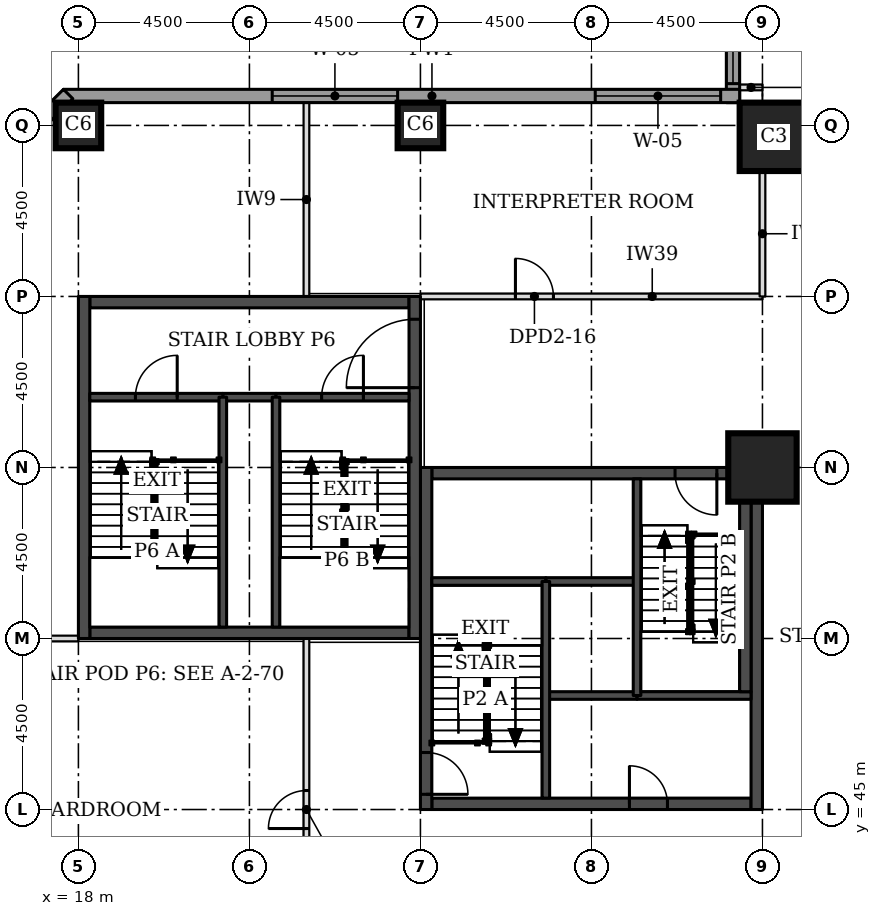
"""IFC4 building model, lengths in metres.
Left out: names, types, materials, properties, quantities, classifications, styles, units other than length and angle.
Written with IfcOpenShell. Run it as: python <this file> out.ifc"""

import sys

from ifc_helpers import new_model, si_unit, direction, frame, frame_2d, origin, origin_2d, place, context, subcontext, project, spatial, rectangle, extrude, element, fill, save


model = new_model("IFC4")
c1 = context("Model", 3, precision=1e-05, world=origin(), true_north=direction((0.0, 1.0)))
c2 = subcontext(c1, "Body", "Model", "MODEL_VIEW")
j1 = project(units=[si_unit("LENGTHUNIT", "METRE"), si_unit("PLANEANGLEUNIT", "RADIAN")], contexts=[c1])
p1 = place(None, origin())
s1 = spatial("IfcSite", under=j1, at=p1, CompositionType="ELEMENT")
p2 = place(p1, origin())
s2 = spatial("IfcBuilding", under=s1, at=p2, CompositionType="ELEMENT")
p3 = place(p2, frame((0.0, 0.0, 13.5)))
s3 = spatial("IfcBuildingStorey", under=s2, at=p3, CompositionType="ELEMENT", Elevation=13.5)
p4 = place(p3, frame((36.0, 54.0, 0.0), z_axis=(0.0, 0.0, 1.0), x_axis=(1.0, 0.0, 0.0)))
e1 = element("IfcColumn", 1, at=p4, inside=s3, PredefinedType="COLUMN", context=c2, shape_type="SweptSolid", body=[
    extrude(rectangle(XDim=1.8, YDim=1.8, at=origin_2d()), origin(), (0.0, 0.0, 1.0), 5.0),
])
for number, where, z_axis, x_axis in (
    (2, (18.0, 63.0, 0.0), (0.0, 0.0, 1.0), (1.0, 0.0, 0.0)),
    (3, (27.0, 63.0, 0.0), (0.0, 0.0, 1.0), (1.0, 0.0, 0.0)),
):
    element("IfcColumn", number, at=place(p3, frame(where, z_axis=z_axis, x_axis=x_axis)), inside=s3, PredefinedType="COLUMN", context=c2, shape_type="SweptSolid", body=[
        extrude(rectangle(XDim=1.2, YDim=1.2, at=origin_2d()), origin(), (0.0, 0.0, 1.0), 5.0),
    ])
p5 = place(p3, frame((36.3, 62.7, 0.0), z_axis=(0.0, 0.0, 1.0), x_axis=(1.0, 0.0, 0.0)))
e4 = element("IfcColumn", 4, at=p5, inside=s3, PredefinedType="COLUMN", context=c2, shape_type="SweptSolid", body=[
    extrude(rectangle(XDim=1.8, YDim=1.8, at=origin_2d()), origin(), (0.0, 0.0, 1.0), 5.0),
])
p6 = place(p3, frame((27.3, 45.15, 0.0), z_axis=(0.0, 0.0, 1.0), x_axis=(1.0, 0.0, 0.0)))
e5 = element("IfcWall", 5, at=p6, inside=s3, PredefinedType="SHEAR", context=c2, shape_type="SweptSolid", body=[
    extrude(rectangle(XDim=8.4, YDim=0.3, at=frame_2d((4.2, 0.0))), origin(), (0.0, 0.0, 1.0), 5.0),
])
p7 = place(p6, frame((5.2, 0.0, 0.0)))
e6 = element("IfcOpeningElement", 6, at=p7, cuts=e5, PredefinedType="OPENING", context=c2, shape_type="SweptSolid", body=[
    extrude(rectangle(XDim=1.0, YDim=2.1, at=frame_2d((0.5, 1.05))), frame((0.0, 0.16, 0.0), z_axis=(0.0, -1.0, 0.0), x_axis=(1.0, 0.0, 0.0)), (0.0, 0.0, 1.0), 0.32),
])
p8 = place(p3, frame((27.3, 53.85, 0.0), z_axis=(0.0, 0.0, 1.0), x_axis=(1.0, 0.0, 0.0)))
e7 = element("IfcWall", 7, at=p8, inside=s3, PredefinedType="SHEAR", context=c2, shape_type="SweptSolid", body=[
    extrude(rectangle(XDim=8.4, YDim=0.3, at=frame_2d((4.2, 0.0))), origin(), (0.0, 0.0, 1.0), 5.0),
])
p9 = place(p8, frame((6.4, 0.0, 0.0)))
e8 = element("IfcOpeningElement", 8, at=p9, cuts=e7, PredefinedType="OPENING", context=c2, shape_type="SweptSolid", body=[
    extrude(rectangle(XDim=1.1, YDim=2.1, at=frame_2d((0.55, 1.05))), frame((0.0, 0.16, 0.0), z_axis=(0.0, -1.0, 0.0), x_axis=(1.0, 0.0, 0.0)), (0.0, 0.0, 1.0), 0.32),
])
p10 = place(p3, frame((27.15, 45.0, 0.0), z_axis=(0.0, 0.0, 1.0), x_axis=(0.0, 1.0, 0.0)))
e9 = element("IfcWall", 9, at=p10, inside=s3, PredefinedType="SHEAR", context=c2, shape_type="SweptSolid", body=[
    extrude(rectangle(XDim=9.0, YDim=0.3, at=frame_2d((4.5, 0.0))), origin(), (0.0, 0.0, 1.0), 5.0),
])
p11 = place(p10, frame((0.4, 0.0, 0.0)))
e10 = element("IfcOpeningElement", 10, at=p11, cuts=e9, PredefinedType="OPENING", context=c2, shape_type="SweptSolid", body=[
    extrude(rectangle(XDim=1.1, YDim=2.1, at=frame_2d((0.55, 1.05))), frame((0.0, 0.16, 0.0), z_axis=(0.0, -1.0, 0.0), x_axis=(1.0, 0.0, 0.0)), (0.0, 0.0, 1.0), 0.32),
])
p12 = place(p3, frame((35.85, 45.0, 0.0), z_axis=(0.0, 0.0, 1.0), x_axis=(0.0, 1.0, 0.0)))
e11 = element("IfcWall", 11, at=p12, inside=s3, PredefinedType="SHEAR", context=c2, shape_type="SweptSolid", body=[
    extrude(rectangle(XDim=9.0, YDim=0.3, at=frame_2d((4.5, 0.0))), origin(), (0.0, 0.0, 1.0), 5.0),
])
for number, where, z_axis, x_axis in (
    (12, (18.3, 49.65, 0.0), (0.0, 0.0, 1.0), (1.0, 0.0, 0.0)),
    (13, (18.3, 58.35, 0.0), (0.0, 0.0, 1.0), (1.0, 0.0, 0.0)),
):
    element("IfcWall", number, at=place(p3, frame(where, z_axis=z_axis, x_axis=x_axis)), inside=s3, PredefinedType="SHEAR", context=c2, shape_type="SweptSolid", body=[
        extrude(rectangle(XDim=8.4, YDim=0.3, at=frame_2d((4.2, 0.0))), origin(), (0.0, 0.0, 1.0), 5.0),
    ])
p13 = place(p3, frame((18.15, 49.5, 0.0), z_axis=(0.0, 0.0, 1.0), x_axis=(0.0, 1.0, 0.0)))
e14 = element("IfcWall", 14, at=p13, inside=s3, PredefinedType="SHEAR", context=c2, shape_type="SweptSolid", body=[
    extrude(rectangle(XDim=9.0, YDim=0.3, at=frame_2d((4.5, 0.0))), origin(), (0.0, 0.0, 1.0), 5.0),
])
p14 = place(p3, frame((26.85, 49.5, 0.0), z_axis=(0.0, 0.0, 1.0), x_axis=(0.0, 1.0, 0.0)))
e15 = element("IfcWall", 15, at=p14, inside=s3, PredefinedType="SHEAR", context=c2, shape_type="SweptSolid", body=[
    extrude(rectangle(XDim=9.0, YDim=0.3, at=frame_2d((4.5, 0.0))), origin(), (0.0, 0.0, 1.0), 5.0),
])
p15 = place(p14, frame((6.6, 0.0, 0.0)))
e16 = element("IfcOpeningElement", 16, at=p15, cuts=e15, PredefinedType="OPENING", context=c2, shape_type="SweptSolid", body=[
    extrude(rectangle(XDim=1.8, YDim=2.1, at=frame_2d((0.9, 1.05))), frame((0.0, 0.16, 0.0), z_axis=(0.0, -1.0, 0.0), x_axis=(1.0, 0.0, 0.0)), (0.0, 0.0, 1.0), 0.32),
])
p16 = place(p3, frame((35.225, 76.894, 0.0), z_axis=(0.0, 0.0, 1.0), x_axis=(0.0, -1.0, 0.0)))
e17 = element("IfcWall", 17, at=p16, inside=s3, PredefinedType="STANDARD", context=c2, shape_type="SweptSolid", body=[
    extrude(rectangle(XDim=13.293, YDim=0.35, at=frame_2d((6.647, 0.0))), origin(), (0.0, 0.0, 1.0), 4.755),
])
p17 = place(p16, frame((9.493, 0.0, 0.9)))
e18 = element("IfcOpeningElement", 18, at=p17, cuts=e17, PredefinedType="OPENING", context=c2, shape_type="SweptSolid", body=[
    extrude(rectangle(XDim=3.3, YDim=3.1, at=frame_2d((1.65, 1.55))), frame((0.0, 0.185, 0.0), z_axis=(0.0, -1.0, 0.0), x_axis=(1.0, 0.0, 0.0)), (0.0, 0.0, 1.0), 0.37),
])
p18 = place(p3, frame((35.4, 63.775, 0.0), z_axis=(0.0, 0.0, 1.0), x_axis=(-1.0, 0.0, 0.0)))
e19 = element("IfcWall", 19, at=p18, inside=s3, PredefinedType="STANDARD", context=c2, shape_type="SweptSolid", body=[
    extrude(rectangle(XDim=17.793, YDim=0.35, at=frame_2d((8.897, 0.0))), origin(), (0.0, 0.0, 1.0), 4.755),
])
p19 = place(p18, frame((0.5, 0.0, 0.9)))
e20 = element("IfcOpeningElement", 20, at=p19, cuts=e19, PredefinedType="OPENING", context=c2, shape_type="SweptSolid", body=[
    extrude(rectangle(XDim=3.3, YDim=3.1, at=frame_2d((1.65, 1.55))), frame((0.0, 0.185, 0.0), z_axis=(0.0, -1.0, 0.0), x_axis=(1.0, 0.0, 0.0)), (0.0, 0.0, 1.0), 0.37),
])
p20 = place(p18, frame((9.0, 0.0, 0.9)))
e21 = element("IfcOpeningElement", 21, at=p20, cuts=e19, PredefinedType="OPENING", context=c2, shape_type="SweptSolid", body=[
    extrude(rectangle(XDim=3.3, YDim=3.1, at=frame_2d((1.65, 1.55))), frame((0.0, 0.185, 0.0), z_axis=(0.0, -1.0, 0.0), x_axis=(1.0, 0.0, 0.0)), (0.0, 0.0, 1.0), 0.37),
])
p21 = place(p3, frame((17.73, 63.826, 0.0), z_axis=(0.0, 0.0, 1.0), x_axis=(-0.707106781187, -0.707106781187, 0.0)))
e22 = element("IfcWall", 22, at=p21, inside=s3, PredefinedType="STANDARD", context=c2, shape_type="SweptSolid", body=[
    extrude(rectangle(XDim=7.151, YDim=0.35, at=frame_2d((3.576, 0.0))), origin(), (0.0, 0.0, 1.0), 4.755),
])
p22 = place(p21, frame((1.926, 0.0, 0.9)))
e23 = element("IfcOpeningElement", 23, at=p22, cuts=e22, PredefinedType="OPENING", context=c2, shape_type="SweptSolid", body=[
    extrude(rectangle(XDim=3.3, YDim=3.1, at=frame_2d((1.65, 1.55))), frame((0.0, 0.185, 0.0), z_axis=(0.0, -1.0, 0.0), x_axis=(1.0, 0.0, 0.0)), (0.0, 0.0, 1.0), 0.37),
])
p23 = place(p3, frame((24.0, 40.5, 0.0), z_axis=(0.0, 0.0, 1.0), x_axis=(0.0, 1.0, 0.0)))
e24 = element("IfcWall", 24, at=p23, inside=s3, PredefinedType="PARTITIONING", context=c2, shape_type="SweptSolid", body=[
    extrude(rectangle(XDim=9.0, YDim=0.15, at=frame_2d((4.5, 0.0))), origin(), (0.0, 0.0, 1.0), 4.78),
])
p24 = place(p23, frame((4.0, 0.0, 0.0)))
e25 = element("IfcOpeningElement", 25, at=p24, cuts=e24, PredefinedType="OPENING", context=c2, shape_type="SweptSolid", body=[
    extrude(rectangle(XDim=1.0, YDim=2.1, at=frame_2d((0.5, 1.05))), frame((0.0, 0.085, 0.0), z_axis=(0.0, -1.0, 0.0), x_axis=(1.0, 0.0, 0.0)), (0.0, 0.0, 1.0), 0.17),
])
p25 = place(p3, frame((14.1, 49.5, 0.0), z_axis=(0.0, 0.0, 1.0), x_axis=(1.0, 0.0, 0.0)))
e26 = element("IfcWall", 26, at=p25, inside=s3, PredefinedType="PARTITIONING", context=c2, shape_type="SweptSolid", body=[
    extrude(rectangle(XDim=3.9, YDim=0.15, at=frame_2d((1.95, 0.0))), origin(), (0.0, 0.0, 1.0), 4.78),
])
p26 = place(p3, frame((27.0, 58.5, 0.0), z_axis=(0.0, 0.0, 1.0), x_axis=(1.0, 0.0, 0.0)))
e27 = element("IfcWall", 27, at=p26, inside=s3, PredefinedType="PARTITIONING", context=c2, shape_type="SweptSolid", body=[
    extrude(rectangle(XDim=9.0, YDim=0.15, at=frame_2d((4.5, 0.0))), origin(), (0.0, 0.0, 1.0), 3.78),
])
p27 = place(p26, frame((2.5, 0.0, 0.0)))
e28 = element("IfcOpeningElement", 28, at=p27, cuts=e27, PredefinedType="OPENING", context=c2, shape_type="SweptSolid", body=[
    extrude(rectangle(XDim=1.0, YDim=2.1, at=frame_2d((0.5, 1.05))), frame((0.0, 0.085, 0.0), z_axis=(0.0, -1.0, 0.0), x_axis=(1.0, 0.0, 0.0)), (0.0, 0.0, 1.0), 0.17),
])
p28 = place(p3, frame((24.0, 58.5, 0.0), z_axis=(0.0, 0.0, 1.0), x_axis=(0.0, 1.0, 0.0)))
e29 = element("IfcWall", 29, at=p28, inside=s3, PredefinedType="PARTITIONING", context=c2, shape_type="SweptSolid", body=[
    extrude(rectangle(XDim=5.1, YDim=0.15, at=frame_2d((2.55, 0.0))), origin(), (0.0, 0.0, 1.0), 4.78),
])
p29 = place(p3, frame((36.0, 58.5, 0.0), z_axis=(0.0, 0.0, 1.0), x_axis=(0.0, 1.0, 0.0)))
e30 = element("IfcWall", 30, at=p29, inside=s3, PredefinedType="PARTITIONING", context=c2, shape_type="SweptSolid", body=[
    extrude(rectangle(XDim=3.3, YDim=0.15, at=frame_2d((1.65, 0.0))), origin(), (0.0, 0.0, 1.0), 4.03),
])
p30 = place(p3, frame((35.4, 64.0, 0.0), z_axis=(0.0, 0.0, 1.0), x_axis=(1.0, 0.0, 0.0)))
e31 = element("IfcWall", 31, at=p30, inside=s3, PredefinedType="PARTITIONING", context=c2, shape_type="SweptSolid", body=[
    extrude(rectangle(XDim=0.6, YDim=0.15, at=frame_2d((0.3, 0.0))), origin(), (0.0, 0.0, 1.0), 4.78),
])
p31 = place(p3, frame((30.3, 48.0, 0.0), z_axis=(0.0, 0.0, 1.0), x_axis=(1.0, 0.0, 0.0)))
e32 = element("IfcWall", 32, at=p31, inside=s3, PredefinedType="SOLIDWALL", context=c2, shape_type="SweptSolid", body=[
    extrude(rectangle(XDim=2.4, YDim=0.2, at=frame_2d((1.2, 0.0))), origin(), (0.0, 0.0, 1.0), 4.78),
])
p32 = place(p3, frame((32.7, 48.0, 0.0), z_axis=(0.0, 0.0, 1.0), x_axis=(1.0, 0.0, 0.0)))
e33 = element("IfcWall", 33, at=p32, inside=s3, PredefinedType="SOLIDWALL", context=c2, shape_type="SweptSolid", body=[
    extrude(rectangle(XDim=3.0, YDim=0.2, at=frame_2d((1.5, 0.0))), origin(), (0.0, 0.0, 1.0), 4.78),
])
p33 = place(p3, frame((30.3, 51.0, 0.0), z_axis=(0.0, 0.0, 1.0), x_axis=(1.0, 0.0, 0.0)))
e34 = element("IfcWall", 34, at=p33, inside=s3, PredefinedType="SOLIDWALL", context=c2, shape_type="SweptSolid", body=[
    extrude(rectangle(XDim=2.4, YDim=0.2, at=frame_2d((1.2, 0.0))), origin(), (0.0, 0.0, 1.0), 5.0),
])
p34 = place(p3, frame((27.3, 51.0, 0.0), z_axis=(0.0, 0.0, 1.0), x_axis=(1.0, 0.0, 0.0)))
e35 = element("IfcWall", 35, at=p34, inside=s3, PredefinedType="SOLIDWALL", context=c2, shape_type="SweptSolid", body=[
    extrude(rectangle(XDim=3.0, YDim=0.2, at=frame_2d((1.5, 0.0))), origin(), (0.0, 0.0, 1.0), 4.78),
])
for number, where, z_axis, x_axis in (
    (36, (30.3, 45.3, 0.0), (0.0, 0.0, 1.0), (0.0, 1.0, 0.0)),
    (37, (32.7, 48.0, 0.0), (0.0, 0.0, 1.0), (0.0, 1.0, 0.0)),
):
    element("IfcWall", number, at=place(p3, frame(where, z_axis=z_axis, x_axis=x_axis)), inside=s3, PredefinedType="SOLIDWALL", context=c2, shape_type="SweptSolid", body=[
        extrude(rectangle(XDim=5.7, YDim=0.2, at=frame_2d((2.85, 0.0))), origin(), (0.0, 0.0, 1.0), 4.78),
    ])
p35 = place(p3, frame((21.8, 55.85, 0.0), z_axis=(0.0, 0.0, 1.0), x_axis=(1.0, 0.0, 0.0)))
e38 = element("IfcWall", 38, at=p35, inside=s3, PredefinedType="SOLIDWALL", context=c2, shape_type="SweptSolid", body=[
    extrude(rectangle(XDim=1.4, YDim=0.2, at=frame_2d((0.7, 0.0))), origin(), (0.0, 0.0, 1.0), 4.78),
])
p36 = place(p3, frame((18.3, 55.85, 0.0), z_axis=(0.0, 0.0, 1.0), x_axis=(1.0, 0.0, 0.0)))
e39 = element("IfcWall", 39, at=p36, inside=s3, PredefinedType="SOLIDWALL", context=c2, shape_type="SweptSolid", body=[
    extrude(rectangle(XDim=3.5, YDim=0.2, at=frame_2d((1.75, 0.0))), origin(), (0.0, 0.0, 1.0), 4.78),
])
p37 = place(p36, frame((1.2, 0.0, 0.0)))
e40 = element("IfcOpeningElement", 40, at=p37, cuts=e39, PredefinedType="OPENING", context=c2, shape_type="SweptSolid", body=[
    extrude(rectangle(XDim=1.1, YDim=2.1, at=frame_2d((0.55, 1.05))), frame((0.0, 0.11, 0.0), z_axis=(0.0, -1.0, 0.0), x_axis=(1.0, 0.0, 0.0)), (0.0, 0.0, 1.0), 0.22),
])
p38 = place(p3, frame((23.2, 55.85, 0.0), z_axis=(0.0, 0.0, 1.0), x_axis=(1.0, 0.0, 0.0)))
e41 = element("IfcWall", 41, at=p38, inside=s3, PredefinedType="SOLIDWALL", context=c2, shape_type="SweptSolid", body=[
    extrude(rectangle(XDim=3.5, YDim=0.2, at=frame_2d((1.75, 0.0))), origin(), (0.0, 0.0, 1.0), 4.78),
])
p39 = place(p38, frame((1.2, 0.0, 0.0)))
e42 = element("IfcOpeningElement", 42, at=p39, cuts=e41, PredefinedType="OPENING", context=c2, shape_type="SweptSolid", body=[
    extrude(rectangle(XDim=1.1, YDim=2.1, at=frame_2d((0.55, 1.05))), frame((0.0, 0.11, 0.0), z_axis=(0.0, -1.0, 0.0), x_axis=(1.0, 0.0, 0.0)), (0.0, 0.0, 1.0), 0.22),
])
for number, where, z_axis, x_axis in (
    (43, (21.8, 49.8, 0.0), (0.0, 0.0, 1.0), (0.0, 1.0, 0.0)),
    (44, (23.2, 49.8, 0.0), (0.0, 0.0, 1.0), (0.0, 1.0, 0.0)),
):
    element("IfcWall", number, at=place(p3, frame(where, z_axis=z_axis, x_axis=x_axis)), inside=s3, PredefinedType="SOLIDWALL", context=c2, shape_type="SweptSolid", body=[
        extrude(rectangle(XDim=6.05, YDim=0.2, at=frame_2d((3.025, 0.0))), origin(), (0.0, 0.0, 1.0), 4.78),
    ])
p40 = place(p3, frame((35.55, 48.1, 0.0), z_axis=(0.0, 0.0, 1.0), x_axis=(0.0, 1.0, 0.0)))
e45 = element("IfcWall", 45, at=p40, inside=s3, PredefinedType="SOLIDWALL", context=c2, shape_type="SweptSolid", body=[
    extrude(rectangle(XDim=5.6, YDim=0.3, at=frame_2d((2.8, 0.0))), origin(), (0.0, 0.0, 1.0), 4.78),
])
p41 = place(p17, origin())
e46 = element("IfcWindow", 46, at=p41, inside=s3, PartitioningType="SINGLE_PANEL", PredefinedType="WINDOW", context=c2, shape_type="SweptSolid", body=[
    extrude(rectangle(XDim=3.3, YDim=3.1, at=frame_2d((1.65, 1.55))), frame((0.0, 0.085, 0.0), z_axis=(0.0, -1.0, 0.0), x_axis=(1.0, 0.0, 0.0)), (0.0, 0.0, 1.0), 0.06),
])
fill(e18, e46)
p42 = place(p19, origin())
e47 = element("IfcWindow", 47, at=p42, inside=s3, PartitioningType="SINGLE_PANEL", PredefinedType="WINDOW", context=c2, shape_type="SweptSolid", body=[
    extrude(rectangle(XDim=3.3, YDim=3.1, at=frame_2d((1.65, 1.55))), frame((0.0, 0.085, 0.0), z_axis=(0.0, -1.0, 0.0), x_axis=(1.0, 0.0, 0.0)), (0.0, 0.0, 1.0), 0.06),
])
fill(e20, e47)
p43 = place(p20, origin())
e48 = element("IfcWindow", 48, at=p43, inside=s3, PartitioningType="SINGLE_PANEL", PredefinedType="WINDOW", context=c2, shape_type="SweptSolid", body=[
    extrude(rectangle(XDim=3.3, YDim=3.1, at=frame_2d((1.65, 1.55))), frame((0.0, 0.085, 0.0), z_axis=(0.0, -1.0, 0.0), x_axis=(1.0, 0.0, 0.0)), (0.0, 0.0, 1.0), 0.06),
])
fill(e21, e48)
p44 = place(p24, origin())
e49 = element("IfcDoor", 49, at=p44, inside=s3, OperationType="SINGLE_SWING_LEFT", PredefinedType="DOOR", context=c2, shape_type="SweptSolid", body=[
    extrude(rectangle(XDim=1.0, YDim=2.1, at=frame_2d((0.5, 1.05))), frame((0.0, 0.025, 0.0), z_axis=(0.0, -1.0, 0.0), x_axis=(1.0, 0.0, 0.0)), (0.0, 0.0, 1.0), 0.05),
])
fill(e25, e49)
p45 = place(p27, origin())
e50 = element("IfcDoor", 50, at=p45, inside=s3, OperationType="SINGLE_SWING_LEFT", PredefinedType="DOOR", context=c2, shape_type="SweptSolid", body=[
    extrude(rectangle(XDim=1.0, YDim=2.1, at=frame_2d((0.5, 1.05))), frame((0.0, 0.025, 0.0), z_axis=(0.0, -1.0, 0.0), x_axis=(1.0, 0.0, 0.0)), (0.0, 0.0, 1.0), 0.05),
])
fill(e28, e50)
p46 = place(p11, frame((1.1, 0.0, 0.0), z_axis=(0.0, 0.0, 1.0), x_axis=(-1.0, 0.0, 0.0)))
e51 = element("IfcDoor", 51, at=p46, inside=s3, OperationType="SINGLE_SWING_RIGHT", PredefinedType="DOOR", context=c2, shape_type="SweptSolid", body=[
    extrude(rectangle(XDim=1.1, YDim=2.1, at=frame_2d((0.55, 1.05))), frame((0.0, 0.025, 0.0), z_axis=(0.0, -1.0, 0.0), x_axis=(1.0, 0.0, 0.0)), (0.0, 0.0, 1.0), 0.05),
])
fill(e10, e51)
p47 = place(p9, frame((1.1, 0.0, 0.0), z_axis=(0.0, 0.0, 1.0), x_axis=(-1.0, 0.0, 0.0)))
e52 = element("IfcDoor", 52, at=p47, inside=s3, OperationType="SINGLE_SWING_LEFT", PredefinedType="DOOR", context=c2, shape_type="SweptSolid", body=[
    extrude(rectangle(XDim=1.1, YDim=2.1, at=frame_2d((0.55, 1.05))), frame((0.0, 0.025, 0.0), z_axis=(0.0, -1.0, 0.0), x_axis=(1.0, 0.0, 0.0)), (0.0, 0.0, 1.0), 0.05),
])
fill(e8, e52)
p48 = place(p7, origin())
e53 = element("IfcDoor", 53, at=p48, inside=s3, OperationType="SINGLE_SWING_LEFT", PredefinedType="DOOR", context=c2, shape_type="SweptSolid", body=[
    extrude(rectangle(XDim=1.0, YDim=2.1, at=frame_2d((0.5, 1.05))), frame((0.0, 0.025, 0.0), z_axis=(0.0, -1.0, 0.0), x_axis=(1.0, 0.0, 0.0)), (0.0, 0.0, 1.0), 0.05),
])
fill(e6, e53)
p49 = place(p37, origin())
e54 = element("IfcDoor", 54, at=p49, inside=s3, OperationType="SINGLE_SWING_RIGHT", PredefinedType="DOOR", context=c2, shape_type="SweptSolid", body=[
    extrude(rectangle(XDim=1.1, YDim=2.1, at=frame_2d((0.55, 1.05))), frame((0.0, 0.025, 0.0), z_axis=(0.0, -1.0, 0.0), x_axis=(1.0, 0.0, 0.0)), (0.0, 0.0, 1.0), 0.05),
])
fill(e40, e54)
p50 = place(p39, origin())
e55 = element("IfcDoor", 55, at=p50, inside=s3, OperationType="SINGLE_SWING_RIGHT", PredefinedType="DOOR", context=c2, shape_type="SweptSolid", body=[
    extrude(rectangle(XDim=1.1, YDim=2.1, at=frame_2d((0.55, 1.05))), frame((0.0, 0.025, 0.0), z_axis=(0.0, -1.0, 0.0), x_axis=(1.0, 0.0, 0.0)), (0.0, 0.0, 1.0), 0.05),
])
fill(e42, e55)
p51 = place(p15, origin())
e56 = element("IfcDoor", 56, at=p51, inside=s3, OperationType="SINGLE_SWING_LEFT", PredefinedType="DOOR", context=c2, shape_type="SweptSolid", body=[
    extrude(rectangle(XDim=1.8, YDim=2.1, at=frame_2d((0.9, 1.05))), frame((0.0, 0.025, 0.0), z_axis=(0.0, -1.0, 0.0), x_axis=(1.0, 0.0, 0.0)), (0.0, 0.0, 1.0), 0.05),
])
fill(e16, e56)
save(model, sys.argv[1])
